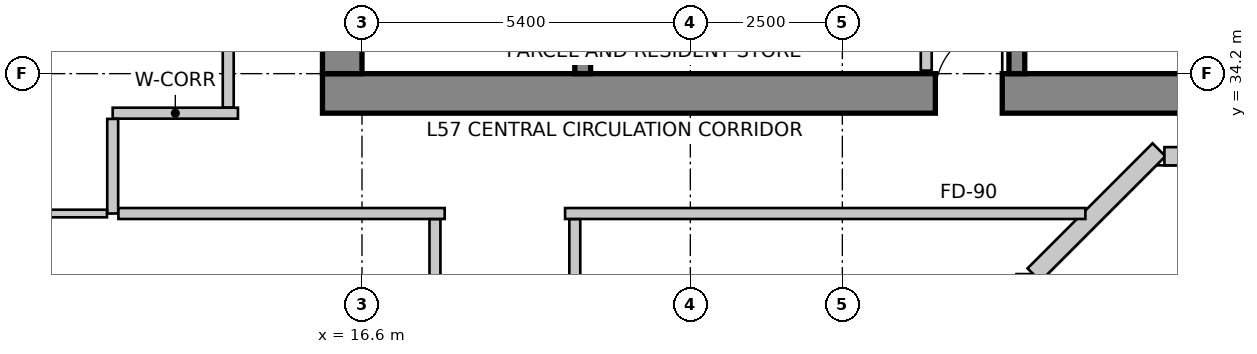
"""IFC4 building model, lengths in metres.
Left out: names, types, materials, properties, quantities, classifications, styles, units other than length and angle.
Written with IfcOpenShell. Run it as: python <this file> out.ifc"""

import sys

from ifc_helpers import new_model, si_unit, direction, frame, frame_2d, origin, place, context, subcontext, project, spatial, rectangle, extrude, source, transform, mapped, element, fill, save


model = new_model("IFC4")
c1 = context("Model", 3, precision=1e-05, world=origin(), true_north=direction((0.0, 1.0)))
c2 = subcontext(c1, "Body", "Model", "MODEL_VIEW")
j1 = project(units=[si_unit("LENGTHUNIT", "METRE"), si_unit("PLANEANGLEUNIT", "RADIAN")], contexts=[c1])
p1 = place(None, origin())
s1 = spatial("IfcSite", under=j1, at=p1, CompositionType="ELEMENT")
p2 = place(p1, origin())
s2 = spatial("IfcBuilding", under=s1, at=p2, CompositionType="ELEMENT")
p3 = place(p2, frame((0.0, 0.0, 225.4)))
s3 = spatial("IfcBuildingStorey", under=s2, at=p3, CompositionType="ELEMENT", Elevation=225.4)
p4 = place(p3, frame((15.95, 33.875, 0.0), z_axis=(0.0, 0.0, 1.0), x_axis=(1.0, 0.0, 0.0)))
e1 = element("IfcWall", 1, at=p4, inside=s3, PredefinedType="SHEAR", context=c2, shape_type="SweptSolid", body=[
    extrude(rectangle(XDim=15.7, YDim=0.65, at=frame_2d((7.85, 0.0))), origin(), (0.0, 0.0, 1.0), 3.5),
])
m1 = source(origin(), c2, "Body", "SweptSolid", [
    extrude(rectangle(XDim=1.1, YDim=2.15, at=frame_2d((0.55, 1.075))), frame((0.0, 0.335, 0.0), z_axis=(0.0, -1.0, 0.0), x_axis=(1.0, 0.0, 0.0)), (0.0, 0.0, 1.0), 0.67),
])
p5 = place(p4, frame((10.08, 0.0, 0.0)))
e2 = element("IfcOpeningElement", 2, at=p5, cuts=e1, PredefinedType="OPENING", context=c2, shape_type="MappedRepresentation", body=[
    mapped(m1, transform((0.0, 0.0, 0.0), scale=1.0)),
])
p6 = place(p3, frame((16.275, 34.2, 0.0), z_axis=(0.0, 0.0, 1.0), x_axis=(0.0, 1.0, 0.0)))
e3 = element("IfcWall", 3, at=p6, inside=s3, PredefinedType="SHEAR", context=c2, shape_type="SweptSolid", body=[
    extrude(rectangle(XDim=11.4, YDim=0.65, at=frame_2d((5.7, 0.0))), origin(), (0.0, 0.0, 1.0), 3.5),
])
p7 = place(p6, frame((7.15, 0.0, 0.0)))
e4 = element("IfcOpeningElement", 4, at=p7, cuts=e3, PredefinedType="OPENING", context=c2, shape_type="MappedRepresentation", body=[
    mapped(m1, transform((0.0, 0.0, 0.0), scale=1.0)),
])
p8 = place(p3, frame((20.23, 34.2, 0.0), z_axis=(0.0, 0.0, 1.0), x_axis=(0.0, 1.0, 0.0)))
e5 = element("IfcWall", 5, at=p8, inside=s3, PredefinedType="SHEAR", context=c2, shape_type="SweptSolid", body=[
    extrude(rectangle(XDim=9.06, YDim=0.26, at=frame_2d((4.53, 0.0))), origin(), (0.0, 0.0, 1.0), 3.5),
])
m2 = source(origin(), c2, "Body", "SweptSolid", [
    extrude(rectangle(XDim=1.1, YDim=2.15, at=frame_2d((0.55, 1.075))), frame((0.0, 0.14, 0.0), z_axis=(0.0, -1.0, 0.0), x_axis=(1.0, 0.0, 0.0)), (0.0, 0.0, 1.0), 0.28),
])
p9 = place(p8, frame((7.45, 0.0, 0.0)))
e6 = element("IfcOpeningElement", 6, at=p9, cuts=e5, PredefinedType="OPENING", context=c2, shape_type="MappedRepresentation", body=[
    mapped(m2, transform((0.0, 0.0, 0.0), scale=1.0)),
])
p10 = place(p3, frame((27.37, 34.2, 0.0), z_axis=(0.0, 0.0, 1.0), x_axis=(0.0, 1.0, 0.0)))
e7 = element("IfcWall", 7, at=p10, inside=s3, PredefinedType="SHEAR", context=c2, shape_type="SweptSolid", body=[
    extrude(rectangle(XDim=9.06, YDim=0.26, at=frame_2d((4.53, 0.0))), origin(), (0.0, 0.0, 1.0), 3.5),
])
p11 = place(p10, frame((7.45, 0.0, 0.0)))
e8 = element("IfcOpeningElement", 8, at=p11, cuts=e7, PredefinedType="OPENING", context=c2, shape_type="MappedRepresentation", body=[
    mapped(m2, transform((0.0, 0.0, 0.0), scale=1.0)),
])
p12 = place(p3, frame((27.514, 29.677, 0.0), z_axis=(0.0, 0.0, 1.0), x_axis=(0.0, 1.0, 0.0)))
e9 = element("IfcWall", 9, at=p12, inside=s3, PredefinedType="SOLIDWALL", context=c2, shape_type="SweptSolid", body=[
    extrude(rectangle(XDim=1.228, YDim=0.3, at=frame_2d((0.614, 0.0))), origin(), (0.0, 0.0, 1.0), 3.25),
])
p13 = place(p3, frame((27.652, 30.892, 0.0), z_axis=(0.0, 0.0, 1.0), x_axis=(0.707106781187, 0.707106781187, 0.0)))
e10 = element("IfcWall", 10, at=p13, inside=s3, PredefinedType="SOLIDWALL", context=c2, shape_type="SweptSolid", body=[
    extrude(rectangle(XDim=2.907, YDim=0.3, at=frame_2d((1.454, 0.0))), origin(), (0.0, 0.0, 1.0), 3.25),
])
p14 = place(p3, frame((29.797, 32.842, 0.0), z_axis=(0.0, 0.0, 1.0), x_axis=(1.0, 0.0, 0.0)))
e11 = element("IfcWall", 11, at=p14, inside=s3, PredefinedType="SOLIDWALL", context=c2, shape_type="SweptSolid", body=[
    extrude(rectangle(XDim=12.491, YDim=0.3, at=frame_2d((6.245, 0.0))), origin(), (0.0, 0.0, 1.0), 3.25),
])
m3 = source(origin(), c2, "Body", "SweptSolid", [
    extrude(rectangle(XDim=1.6, YDim=2.15, at=frame_2d((0.8, 1.075))), frame((0.0, 0.16, 0.0), z_axis=(0.0, -1.0, 0.0), x_axis=(1.0, 0.0, 0.0)), (0.0, 0.0, 1.0), 0.32),
])
p15 = place(p14, frame((4.403, 0.0, 0.0)))
e12 = element("IfcOpeningElement", 12, at=p15, cuts=e11, PredefinedType="OPENING", context=c2, shape_type="MappedRepresentation", body=[
    mapped(m3, transform((0.0, 0.0, 0.0), scale=1.0)),
])
m4 = source(origin(), c2, "Body", "SweptSolid", [
    extrude(rectangle(XDim=2.1, YDim=2.0, at=frame_2d((1.05, 1.0))), frame((0.0, 0.16, 0.0), z_axis=(0.0, -1.0, 0.0), x_axis=(1.0, 0.0, 0.0)), (0.0, 0.0, 1.0), 0.32),
])
p16 = place(p14, frame((1.171, 0.0, 0.85)))
e13 = element("IfcOpeningElement", 13, at=p16, cuts=e11, PredefinedType="OPENING", context=c2, shape_type="MappedRepresentation", body=[
    mapped(m4, transform((0.0, 0.0, 0.0), scale=1.0)),
])
p17 = place(p14, frame((8.177, 0.0, 0.85)))
e14 = element("IfcOpeningElement", 14, at=p17, cuts=e11, PredefinedType="OPENING", context=c2, shape_type="MappedRepresentation", body=[
    mapped(m4, transform((0.0, 0.0, 0.0), scale=1.0)),
])
p18 = place(p3, frame((13.269, 47.134, 0.0), z_axis=(0.0, 0.0, 1.0), x_axis=(-0.319920776449, -0.947444297464, 0.0)))
e15 = element("IfcWall", 15, at=p18, inside=s3, PredefinedType="SOLIDWALL", context=c2, shape_type="SweptSolid", body=[
    extrude(rectangle(XDim=16.133, YDim=0.3, at=frame_2d((8.067, 0.0))), origin(), (0.0, 0.0, 1.0), 3.25),
])
p19 = place(p18, frame((2.513, 0.0, 0.85)))
e16 = element("IfcOpeningElement", 16, at=p19, cuts=e15, PredefinedType="OPENING", context=c2, shape_type="MappedRepresentation", body=[
    mapped(m4, transform((0.0, 0.0, 0.0), scale=1.0)),
])
m5 = source(origin(), c2, "Body", "SweptSolid", [
    extrude(rectangle(XDim=2.4, YDim=2.2, at=frame_2d((1.2, 1.1))), frame((0.0, 0.16, 0.0), z_axis=(0.0, -1.0, 0.0), x_axis=(1.0, 0.0, 0.0)), (0.0, 0.0, 1.0), 0.32),
])
p20 = place(p18, frame((7.26, 0.0, 0.85)))
e17 = element("IfcOpeningElement", 17, at=p20, cuts=e15, PredefinedType="OPENING", context=c2, shape_type="MappedRepresentation", body=[
    mapped(m5, transform((0.0, 0.0, 0.0), scale=1.0)),
])
p21 = place(p18, frame((12.307, 0.0, 0.85)))
e18 = element("IfcOpeningElement", 18, at=p21, cuts=e15, PredefinedType="OPENING", context=c2, shape_type="MappedRepresentation", body=[
    mapped(m4, transform((0.0, 0.0, 0.0), scale=1.0)),
])
p22 = place(p3, frame((8.188, 31.834, 0.0), z_axis=(0.0, 0.0, 1.0), x_axis=(0.202303475707, -0.979322880217, 0.0)))
e19 = element("IfcWall", 19, at=p22, inside=s3, PredefinedType="SOLIDWALL", context=c2, shape_type="SweptSolid", body=[
    extrude(rectangle(XDim=15.766, YDim=0.3, at=frame_2d((7.883, 0.0))), origin(), (0.0, 0.0, 1.0), 3.25),
])
p23 = place(p22, frame((1.473, 0.0, 0.85)))
e20 = element("IfcOpeningElement", 20, at=p23, cuts=e19, PredefinedType="OPENING", context=c2, shape_type="MappedRepresentation", body=[
    mapped(m5, transform((0.0, 0.0, 0.0), scale=1.0)),
])
p24 = place(p22, frame((6.33, 0.0, 0.85)))
e21 = element("IfcOpeningElement", 21, at=p24, cuts=e19, PredefinedType="OPENING", context=c2, shape_type="MappedRepresentation", body=[
    mapped(m4, transform((0.0, 0.0, 0.0), scale=1.0)),
])
p25 = place(p22, frame((10.887, 0.0, 0.85)))
e22 = element("IfcOpeningElement", 22, at=p25, cuts=e19, PredefinedType="OPENING", context=c2, shape_type="MappedRepresentation", body=[
    mapped(m5, transform((0.0, 0.0, 0.0), scale=1.0)),
])
p26 = place(p3, frame((25.88, 35.956, 0.0), z_axis=(0.0, 0.0, 1.0), x_axis=(0.0, -1.0, 0.0)))
e23 = element("IfcWall", 23, at=p26, inside=s3, PredefinedType="PARTITIONING", context=c2, shape_type="SweptSolid", body=[
    extrude(rectangle(XDim=1.706, YDim=0.18, at=frame_2d((0.853, 0.0))), origin(), (0.0, 0.0, 1.0), 2.542),
])
p27 = place(p3, frame((12.5, 33.55, 0.0), z_axis=(0.0, 0.0, 1.0), x_axis=(1.0, 0.0, 0.0)))
e24 = element("IfcWall", 24, at=p27, inside=s3, PredefinedType="PARTITIONING", context=c2, shape_type="SweptSolid", body=[
    extrude(rectangle(XDim=2.06, YDim=0.18, at=frame_2d((1.03, 0.0))), origin(), (0.0, 0.0, 1.0), 3.25),
])
p28 = place(p3, frame((12.5, 31.9, 0.0), z_axis=(0.0, 0.0, 1.0), x_axis=(0.0, 1.0, 0.0)))
e25 = element("IfcWall", 25, at=p28, inside=s3, PredefinedType="PARTITIONING", context=c2, shape_type="SweptSolid", body=[
    extrude(rectangle(XDim=1.556, YDim=0.18, at=frame_2d((0.778, 0.0))), origin(), (0.0, 0.0, 1.0), 2.835),
])
p29 = place(p3, frame((17.96, 31.9, 0.0), z_axis=(0.0, 0.0, 1.0), x_axis=(-1.0, 0.0, 0.0)))
e26 = element("IfcWall", 26, at=p29, inside=s3, PredefinedType="PARTITIONING", context=c2, shape_type="SweptSolid", body=[
    extrude(rectangle(XDim=5.366, YDim=0.18, at=frame_2d((2.683, 0.0))), origin(), (0.0, 0.0, 1.0), 2.835),
])
p30 = place(p3, frame((28.497, 31.9, 0.0), z_axis=(0.0, 0.0, 1.0), x_axis=(-1.0, 0.0, 0.0)))
e27 = element("IfcWall", 27, at=p30, inside=s3, PredefinedType="PARTITIONING", context=c2, shape_type="SweptSolid", body=[
    extrude(rectangle(XDim=8.557, YDim=0.18, at=frame_2d((4.279, 0.0))), origin(), (0.0, 0.0, 1.0), 2.835),
])
p31 = place(p3, frame((14.4, 33.644, 0.0), z_axis=(0.0, 0.0, 1.0), x_axis=(0.0, 1.0, 0.0)))
e28 = element("IfcWall", 28, at=p31, inside=s3, PredefinedType="PARTITIONING", context=c2, shape_type="SweptSolid", body=[
    extrude(rectangle(XDim=12.606, YDim=0.18, at=frame_2d((6.303, 0.0))), origin(), (0.0, 0.0, 1.0), 3.25),
])
m6 = source(origin(), c2, "Body", "SweptSolid", [
    extrude(rectangle(XDim=0.9, YDim=2.15, at=frame_2d((0.45, 1.075))), frame((0.0, 0.1, 0.0), z_axis=(0.0, -1.0, 0.0), x_axis=(1.0, 0.0, 0.0)), (0.0, 0.0, 1.0), 0.2),
])
p32 = place(p31, frame((4.399, 0.0, 0.0)))
e29 = element("IfcOpeningElement", 29, at=p32, cuts=e28, PredefinedType="OPENING", context=c2, shape_type="MappedRepresentation", body=[
    mapped(m6, transform((0.0, 0.0, 0.0), scale=1.0)),
])
p33 = place(p3, frame((12.406, 31.9, 0.0), z_axis=(0.0, 0.0, 1.0), x_axis=(-1.0, 0.0, 0.0)))
e30 = element("IfcWall", 30, at=p33, inside=s3, PredefinedType="PARTITIONING", context=c2, shape_type="SweptSolid", body=[
    extrude(rectangle(XDim=4.115, YDim=0.125, at=frame_2d((2.057, 0.0))), origin(), (0.0, 0.0, 1.0), 2.542),
])
p34 = place(p3, frame((17.8, 17.5, 0.0), z_axis=(0.0, 0.0, 1.0), x_axis=(0.0, 1.0, 0.0)))
e31 = element("IfcWall", 31, at=p34, inside=s3, PredefinedType="PARTITIONING", context=c2, shape_type="SweptSolid", body=[
    extrude(rectangle(XDim=14.306, YDim=0.18, at=frame_2d((7.153, 0.0))), origin(), (0.0, 0.0, 1.0), 2.688),
])
p35 = place(p34, frame((6.643, 0.0, 0.0)))
e32 = element("IfcOpeningElement", 32, at=p35, cuts=e31, PredefinedType="OPENING", context=c2, shape_type="MappedRepresentation", body=[
    mapped(m6, transform((0.0, 0.0, 0.0), scale=1.0)),
])
p36 = place(p3, frame((20.1, 31.806, 0.0), z_axis=(0.0, 0.0, 1.0), x_axis=(0.0, -1.0, 0.0)))
e33 = element("IfcWall", 33, at=p36, inside=s3, PredefinedType="PARTITIONING", context=c2, shape_type="SweptSolid", body=[
    extrude(rectangle(XDim=14.306, YDim=0.18, at=frame_2d((7.153, 0.0))), origin(), (0.0, 0.0, 1.0), 2.688),
])
p37 = place(p36, frame((6.643, 0.0, 0.0)))
e34 = element("IfcOpeningElement", 34, at=p37, cuts=e33, PredefinedType="OPENING", context=c2, shape_type="MappedRepresentation", body=[
    mapped(m6, transform((0.0, 0.0, 0.0), scale=1.0)),
])
m7 = source(origin(), c2, "Body", "SweptSolid", [
    extrude(rectangle(XDim=1.1, YDim=2.15, at=frame_2d((0.55, 1.075))), frame((0.0, 0.025, 0.0), z_axis=(0.0, -1.0, 0.0), x_axis=(1.0, 0.0, 0.0)), (0.0, 0.0, 1.0), 0.05),
])
p38 = place(p5, origin())
e35 = element("IfcDoor", 35, at=p38, inside=s3, OperationType="SINGLE_SWING_RIGHT", PredefinedType="DOOR", context=c2, shape_type="MappedRepresentation", body=[
    mapped(m7, transform((0.0, 0.0, 0.0), scale=1.0)),
])
fill(e2, e35)
save(model, sys.argv[1])
